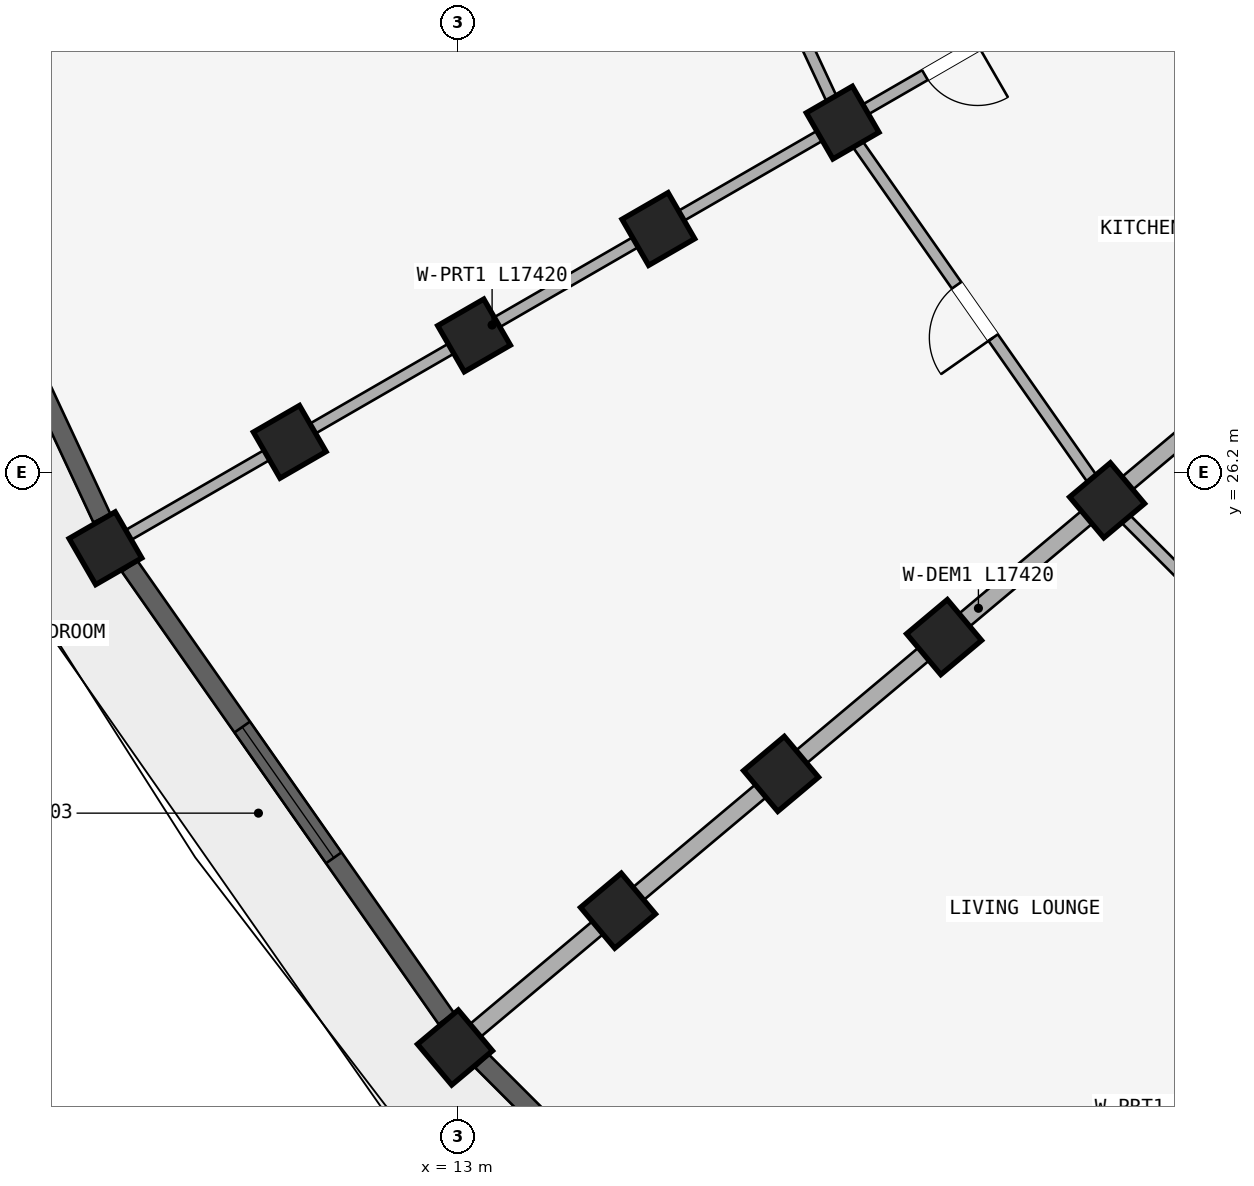
"""IFC4 building model, lengths in metres.
Left out: names, types, materials, properties, quantities, classifications, styles, units other than length and angle.
Written with IfcOpenShell. Run it as: python <this file> out.ifc"""

import sys

from ifc_helpers import new_model, si_unit, direction, frame, frame_2d, origin, origin_2d, place, context, subcontext, project, spatial, rectangle, extrude, element, fill, save


model = new_model("IFC4")
c1 = context("Model", 3, precision=1e-05, world=origin(), true_north=direction((0.0, 1.0)))
c2 = subcontext(c1, "Body", "Model", "MODEL_VIEW")
j1 = project(units=[si_unit("LENGTHUNIT", "METRE"), si_unit("PLANEANGLEUNIT", "RADIAN")], contexts=[c1])
p1 = place(None, origin())
s1 = spatial("IfcSite", under=j1, at=p1, CompositionType="ELEMENT")
p2 = place(p1, origin())
s2 = spatial("IfcBuilding", under=s1, at=p2, CompositionType="ELEMENT")
p3 = place(p2, frame((0.0, 0.0, 18.15)))
s3 = spatial("IfcBuildingStorey", under=s2, at=p3, CompositionType="ELEMENT", Elevation=18.15)
for number, where, z_axis, x_axis in (
    (1, (21.542, 25.831, 0.0), (0.0, 0.0, 1.0), (-0.643, 0.766, 0.0)),
    (2, (19.397, 24.031, 0.0), (0.0, 0.0, 1.0), (-0.643, 0.766, 0.0)),
    (3, (17.252, 22.231, 0.0), (0.0, 0.0, 1.0), (-0.643, 0.766, 0.0)),
    (4, (15.107, 20.432, 0.0), (0.0, 0.0, 1.0), (-0.643, 0.766, 0.0)),
):
    element("IfcColumn", number, at=place(p3, frame(where, z_axis=z_axis, x_axis=x_axis)), inside=s3, PredefinedType="COLUMN", context=c2, shape_type="SweptSolid", body=[
        extrude(rectangle(XDim=0.7, YDim=0.7, at=origin_2d()), origin(), (0.0, 0.0, 1.0), 2.93),
    ])
p4 = place(p3, frame((12.962, 18.632, 0.0), z_axis=(0.0, 0.0, 1.0), x_axis=(-0.642787609687, 0.766044443119, 0.0)))
e5 = element("IfcColumn", 5, at=p4, inside=s3, PredefinedType="COLUMN", context=c2, shape_type="SweptSolid", body=[
    extrude(rectangle(XDim=0.7, YDim=0.7, at=origin_2d()), origin(), (0.0, 0.0, 1.0), 2.97),
])
for number, where, z_axis, x_axis in (
    (6, (18.062, 30.8, 0.0), (0.0, 0.0, 1.0), (-0.5, 0.866, 0.0)),
    (7, (15.637, 29.4, 0.0), (0.0, 0.0, 1.0), (-0.5, 0.866, 0.0)),
    (8, (13.213, 28.0, 0.0), (0.0, 0.0, 1.0), (-0.5, 0.866, 0.0)),
    (9, (10.788, 26.6, 0.0), (0.0, 0.0, 1.0), (-0.5, 0.866, 0.0)),
):
    element("IfcColumn", number, at=place(p3, frame(where, z_axis=z_axis, x_axis=x_axis)), inside=s3, PredefinedType="COLUMN", context=c2, shape_type="SweptSolid", body=[
        extrude(rectangle(XDim=0.7, YDim=0.7, at=origin_2d()), origin(), (0.0, 0.0, 1.0), 2.93),
    ])
p5 = place(p3, frame((8.363, 25.2, 0.0), z_axis=(0.0, 0.0, 1.0), x_axis=(-0.5, 0.866025403784, 0.0)))
e10 = element("IfcColumn", 10, at=p5, inside=s3, PredefinedType="COLUMN", context=c2, shape_type="SweptSolid", body=[
    extrude(rectangle(XDim=0.7, YDim=0.7, at=origin_2d()), origin(), (0.0, 0.0, 1.0), 2.97),
])
p6 = place(p3, frame((30.009, 26.521, 0.0), z_axis=(0.0, 0.0, 1.0), x_axis=(-0.642784757967, -0.766046835987, 0.0)))
e11 = element("IfcWall", 11, at=p6, inside=s3, PredefinedType="PARTITIONING", context=c2, shape_type="SweptSolid", body=[
    extrude(rectangle(XDim=17.42, YDim=0.15, at=frame_2d((8.71, 0.0))), origin(), (0.0, 0.0, 1.0), 2.372),
])
p7 = place(p6, frame((4.45, 0.0, 0.0)))
e12 = element("IfcOpeningElement", 12, at=p7, cuts=e11, PredefinedType="OPENING", context=c2, shape_type="SweptSolid", body=[
    extrude(rectangle(XDim=0.8, YDim=2.1, at=frame_2d((0.4, 1.05))), frame((0.0, 0.085, 0.0), z_axis=(0.0, -1.0, 0.0), x_axis=(1.0, 0.0, 0.0)), (0.0, 0.0, 1.0), 0.17),
])
p8 = place(p3, frame((26.521, 30.009, 0.0), z_axis=(0.0, 0.0, 1.0), x_axis=(-0.766046835987, -0.642784757967, 0.0)))
e13 = element("IfcWall", 13, at=p8, inside=s3, PredefinedType="STANDARD", context=c2, shape_type="SweptSolid", body=[
    extrude(rectangle(XDim=17.42, YDim=0.22, at=frame_2d((8.71, 0.0))), origin(), (0.0, 0.0, 1.0), 2.372),
])
p9 = place(p3, frame((23.691, 34.05, 0.0), z_axis=(0.0, 0.0, 1.0), x_axis=(-0.866026648973, -0.499997843263, 0.0)))
e14 = element("IfcWall", 14, at=p9, inside=s3, PredefinedType="PARTITIONING", context=c2, shape_type="SweptSolid", body=[
    extrude(rectangle(XDim=17.42, YDim=0.15, at=frame_2d((8.71, 0.0))), origin(), (0.0, 0.0, 1.0), 2.372),
])
p10 = place(p9, frame((4.45, 0.0, 0.0)))
e15 = element("IfcOpeningElement", 15, at=p10, cuts=e14, PredefinedType="OPENING", context=c2, shape_type="SweptSolid", body=[
    extrude(rectangle(XDim=0.8, YDim=2.1, at=frame_2d((0.4, 1.05))), frame((0.0, 0.085, 0.0), z_axis=(0.0, -1.0, 0.0), x_axis=(1.0, 0.0, 0.0)), (0.0, 0.0, 1.0), 0.17),
])
p11 = place(p3, frame((25.831, 21.542, 0.0), z_axis=(0.0, 0.0, 1.0), x_axis=(-0.707106781187, 0.707106781187, 0.0)))
e16 = element("IfcWall", 16, at=p11, inside=s3, PredefinedType="PLUMBINGWALL", context=c2, shape_type="SweptSolid", body=[
    extrude(rectangle(XDim=6.066, YDim=0.15, at=frame_2d((3.033, 0.0))), origin(), (0.0, 0.0, 1.0), 2.372),
])
p12 = place(p11, frame((2.633, 0.0, 0.0)))
e17 = element("IfcOpeningElement", 17, at=p12, cuts=e16, PredefinedType="OPENING", context=c2, shape_type="SweptSolid", body=[
    extrude(rectangle(XDim=0.8, YDim=2.1, at=frame_2d((0.4, 1.05))), frame((0.0, 0.085, 0.0), z_axis=(0.0, -1.0, 0.0), x_axis=(1.0, 0.0, 0.0)), (0.0, 0.0, 1.0), 0.17),
])
p13 = place(p3, frame((21.542, 25.831, 0.0), z_axis=(0.0, 0.0, 1.0), x_axis=(-0.573594691504, 0.81913926159, 0.0)))
e18 = element("IfcWall", 18, at=p13, inside=s3, PredefinedType="PLUMBINGWALL", context=c2, shape_type="SweptSolid", body=[
    extrude(rectangle(XDim=6.066, YDim=0.15, at=frame_2d((3.033, 0.0))), origin(), (0.0, 0.0, 1.0), 2.372),
])
p14 = place(p13, frame((2.613, 0.0, 0.0)))
e19 = element("IfcOpeningElement", 19, at=p14, cuts=e18, PredefinedType="OPENING", context=c2, shape_type="SweptSolid", body=[
    extrude(rectangle(XDim=0.84, YDim=2.1, at=frame_2d((0.42, 1.05))), frame((0.0, 0.085, 0.0), z_axis=(0.0, -1.0, 0.0), x_axis=(1.0, 0.0, 0.0)), (0.0, 0.0, 1.0), 0.17),
])
p15 = place(p3, frame((18.062, 30.8, 0.0), z_axis=(0.0, 0.0, 1.0), x_axis=(-0.42260781991, 0.906312656069, 0.0)))
e20 = element("IfcWall", 20, at=p15, inside=s3, PredefinedType="PLUMBINGWALL", context=c2, shape_type="SweptSolid", body=[
    extrude(rectangle(XDim=6.066, YDim=0.15, at=frame_2d((3.033, 0.0))), origin(), (0.0, 0.0, 1.0), 2.372),
])
p16 = place(p15, frame((2.653, 0.0, 0.0)))
e21 = element("IfcOpeningElement", 21, at=p16, cuts=e20, PredefinedType="OPENING", context=c2, shape_type="SweptSolid", body=[
    extrude(rectangle(XDim=0.76, YDim=2.05, at=frame_2d((0.38, 1.025))), frame((0.0, 0.085, 0.0), z_axis=(0.0, -1.0, 0.0), x_axis=(1.0, 0.0, 0.0)), (0.0, 0.0, 1.0), 0.17),
])
p17 = place(p3, frame((18.454, 13.316, 0.0), z_axis=(0.0, 0.0, 1.0), x_axis=(-0.707106781187, 0.707106781187, 0.0)))
e22 = element("IfcWall", 22, at=p17, inside=s3, PredefinedType="STANDARD", context=c2, shape_type="SweptSolid", body=[
    extrude(rectangle(XDim=7.267, YDim=0.25, at=frame_2d((3.633, 0.0))), origin(), (0.0, 0.0, 1.0), 2.412),
])
p18 = place(p17, frame((4.766, 0.0, 0.562)))
e23 = element("IfcOpeningElement", 23, at=p18, cuts=e22, PredefinedType="OPENING", context=c2, shape_type="SweptSolid", body=[
    extrude(rectangle(XDim=1.2, YDim=1.5, at=frame_2d((0.6, 0.75))), frame((0.0, 0.135, 0.0), z_axis=(0.0, -1.0, 0.0), x_axis=(1.0, 0.0, 0.0)), (0.0, 0.0, 1.0), 0.27),
])
p19 = place(p17, frame((1.883, 0.0, 0.0)))
e24 = element("IfcOpeningElement", 24, at=p19, cuts=e22, PredefinedType="OPENING", context=c2, shape_type="SweptSolid", body=[
    extrude(rectangle(XDim=1.32, YDim=2.15, at=frame_2d((0.66, 1.075))), frame((0.0, 0.135, 0.0), z_axis=(0.0, -1.0, 0.0), x_axis=(1.0, 0.0, 0.0)), (0.0, 0.0, 1.0), 0.27),
])
p20 = place(p3, frame((12.849, 19.011, 0.0), z_axis=(0.0, 0.0, 1.0), x_axis=(-0.573566061701, 0.819159308599, 0.0)))
e25 = element("IfcWall", 25, at=p20, inside=s3, PredefinedType="STANDARD", context=c2, shape_type="SweptSolid", body=[
    extrude(rectangle(XDim=7.267, YDim=0.25, at=frame_2d((3.633, 0.0))), origin(), (0.0, 0.0, 1.0), 2.412),
])
p21 = place(p20, frame((2.583, 0.0, 0.412)))
e26 = element("IfcOpeningElement", 26, at=p21, cuts=e25, PredefinedType="OPENING", context=c2, shape_type="SweptSolid", body=[
    extrude(rectangle(XDim=2.1, YDim=1.8, at=frame_2d((1.05, 0.9))), frame((0.0, 0.135, 0.0), z_axis=(0.0, -1.0, 0.0), x_axis=(1.0, 0.0, 0.0)), (0.0, 0.0, 1.0), 0.27),
])
p22 = place(p3, frame((8.317, 25.594, 0.0), z_axis=(0.0, 0.0, 1.0), x_axis=(-0.422627946127, 0.90630327107, 0.0)))
e27 = element("IfcWall", 27, at=p22, inside=s3, PredefinedType="STANDARD", context=c2, shape_type="SweptSolid", body=[
    extrude(rectangle(XDim=7.267, YDim=0.25, at=frame_2d((3.633, 0.0))), origin(), (0.0, 0.0, 1.0), 2.412),
])
p23 = place(p22, frame((2.658, 0.0, 0.362)))
e28 = element("IfcOpeningElement", 28, at=p23, cuts=e27, PredefinedType="OPENING", context=c2, shape_type="SweptSolid", body=[
    extrude(rectangle(XDim=1.95, YDim=1.85, at=frame_2d((0.975, 0.925))), frame((0.0, 0.135, 0.0), z_axis=(0.0, -1.0, 0.0), x_axis=(1.0, 0.0, 0.0)), (0.0, 0.0, 1.0), 0.27),
])
p24 = place(p21, origin())
e29 = element("IfcWindow", 29, at=p24, inside=s3, PartitioningType="TRIPLE_PANEL_VERTICAL", PredefinedType="WINDOW", context=c2, shape_type="SweptSolid", body=[
    extrude(rectangle(XDim=2.1, YDim=1.8, at=frame_2d((1.05, 0.9))), frame((0.0, 0.03, 0.0), z_axis=(0.0, -1.0, 0.0), x_axis=(1.0, 0.0, 0.0)), (0.0, 0.0, 1.0), 0.06),
])
fill(e26, e29)
p25 = place(p10, frame((0.8, 0.0, 0.0), z_axis=(0.0, 0.0, 1.0), x_axis=(-1.0, 0.0, 0.0)))
e30 = element("IfcDoor", 30, at=p25, inside=s3, OperationType="SINGLE_SWING_RIGHT", PredefinedType="DOOR", context=c2, shape_type="SweptSolid", body=[
    extrude(rectangle(XDim=0.8, YDim=2.1, at=frame_2d((0.4, 1.05))), frame((0.0, 0.025, 0.0), z_axis=(0.0, -1.0, 0.0), x_axis=(1.0, 0.0, 0.0)), (0.0, 0.0, 1.0), 0.05),
])
fill(e15, e30)
p26 = place(p14, origin())
e31 = element("IfcDoor", 31, at=p26, inside=s3, OperationType="SINGLE_SWING_LEFT", PredefinedType="DOOR", context=c2, shape_type="SweptSolid", body=[
    extrude(rectangle(XDim=0.84, YDim=2.1, at=frame_2d((0.42, 1.05))), frame((0.0, 0.025, 0.0), z_axis=(0.0, -1.0, 0.0), x_axis=(1.0, 0.0, 0.0)), (0.0, 0.0, 1.0), 0.05),
])
fill(e19, e31)
save(model, sys.argv[1])
